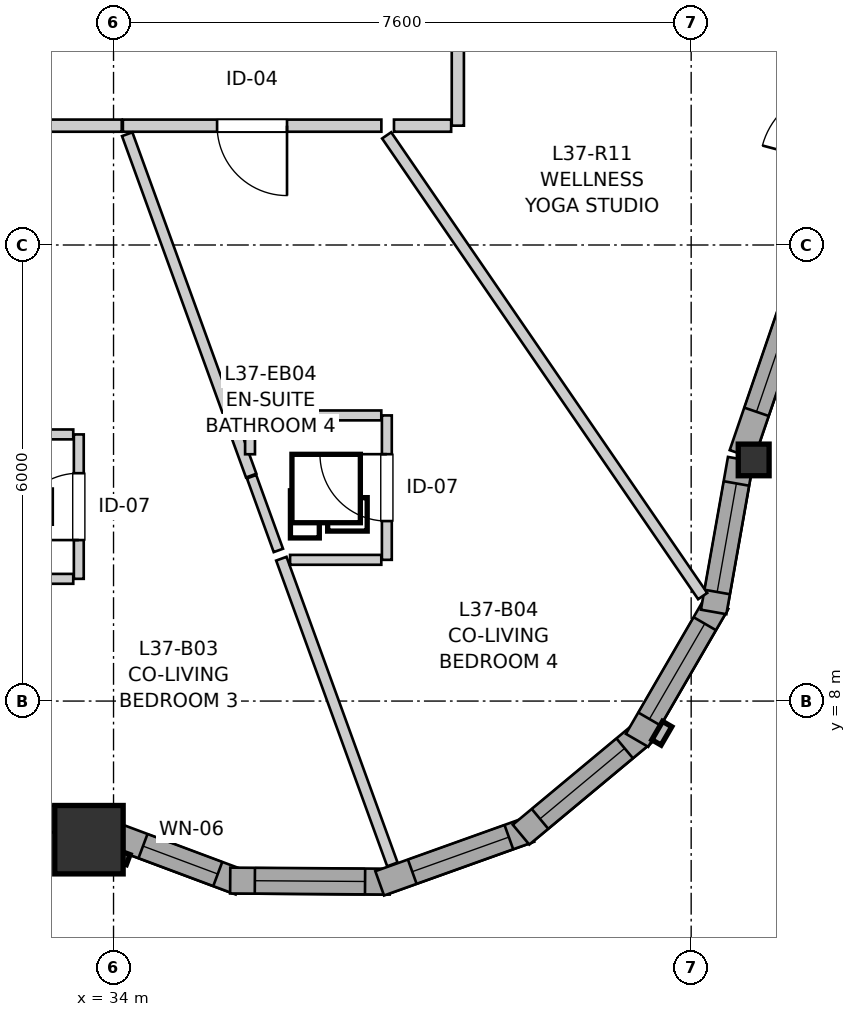
"""IFC4 building model, lengths in metres.
Left out: names, types, materials, properties, quantities, classifications, styles, units other than length and angle.
Written with IfcOpenShell. Run it as: python <this file> out.ifc"""

import sys

from ifc_helpers import new_model, si_unit, direction, frame, frame_2d, origin, origin_2d, place, context, subcontext, project, spatial, rectangle, i_section, extrude, source, transform, mapped, element, fill, save


model = new_model("IFC4")
c1 = context("Model", 3, precision=1e-05, world=origin(), true_north=direction((0.0, 1.0)))
c2 = subcontext(c1, "Body", "Model", "MODEL_VIEW")
j1 = project(units=[si_unit("LENGTHUNIT", "METRE"), si_unit("PLANEANGLEUNIT", "RADIAN")], contexts=[c1])
p1 = place(None, origin())
s1 = spatial("IfcSite", under=j1, at=p1, CompositionType="ELEMENT")
p2 = place(p1, origin())
s2 = spatial("IfcBuilding", under=s1, at=p2, CompositionType="ELEMENT")
p3 = place(p2, frame((0.0, 0.0, 124.8)))
s3 = spatial("IfcBuildingStorey", under=s2, at=p3, CompositionType="ELEMENT", Elevation=124.8)
m1 = source(origin(), c2, "Body", "SweptSolid", [
    extrude(rectangle(XDim=0.9, YDim=0.9, at=origin_2d()), origin(), (0.0, 0.0, 1.0), 2.9),
])
p4 = place(p3, frame((33.677, 6.176, 0.0), z_axis=(0.0, 0.0, 1.0), x_axis=(1.0, 0.0, 0.0)))
e1 = element("IfcColumn", 1, at=p4, inside=s3, PredefinedType="COLUMN", context=c2, shape_type="MappedRepresentation", body=[
    mapped(m1, transform((0.0, 0.0, 0.0), x_axis=(1.0, 0.0, 0.0), y_axis=(0.0, 1.0, 0.0), z_axis=(0.0, 0.0, 1.0), scale=1.0)),
])
m2 = source(origin(), c2, "Body", "SweptSolid", [
    extrude(i_section(OverallWidth=0.406, OverallDepth=0.416, WebThickness=0.027, FlangeThickness=0.044, FilletRadius=0.015, at=origin_2d()), origin(), (0.0, 0.0, 1.0), 2.9),
])
p5 = place(p3, frame((42.423, 11.172, 0.0), z_axis=(0.0, 0.0, 1.0), x_axis=(1.0, 0.0, 0.0)))
e2 = element("IfcColumn", 2, at=p5, inside=s3, PredefinedType="PILASTER", context=c2, shape_type="MappedRepresentation", body=[
    mapped(m2, transform((0.0, 0.0, 0.0), x_axis=(1.0, 0.0, 0.0), y_axis=(0.0, 1.0, 0.0), z_axis=(0.0, 0.0, 1.0), scale=1.0)),
])
p6 = place(p3, frame((30.652, 6.973, 0.0), z_axis=(0.0, 0.0, 1.0), x_axis=(0.979418300652, -0.201841007595, 0.0)))
e3 = element("IfcWall", 3, at=p6, inside=s3, PredefinedType="SOLIDWALL", context=c2, shape_type="SweptSolid", body=[
    extrude(rectangle(XDim=2.893, YDim=0.34, at=frame_2d((1.447, 0.0))), origin(), (0.0, 0.0, 1.0), 2.43),
])
p7 = place(p6, frame((0.383, 0.0, 0.82)))
e4 = element("IfcOpeningElement", 4, at=p7, cuts=e3, PredefinedType="OPENING", context=c2, shape_type="SweptSolid", body=[
    extrude(rectangle(XDim=0.58, YDim=1.35, at=frame_2d((0.29, 0.675))), frame((0.0, 0.18, 0.0), z_axis=(0.0, -1.0, 0.0), x_axis=(1.0, 0.0, 0.0)), (0.0, 0.0, 1.0), 0.36),
])
p8 = place(p6, frame((1.31, 0.0, 0.82)))
e5 = element("IfcOpeningElement", 5, at=p8, cuts=e3, PredefinedType="OPENING", context=c2, shape_type="SweptSolid", body=[
    extrude(rectangle(XDim=1.15, YDim=1.2, at=frame_2d((0.575, 0.6))), frame((0.0, 0.18, 0.0), z_axis=(0.0, -1.0, 0.0), x_axis=(1.0, 0.0, 0.0)), (0.0, 0.0, 1.0), 0.36),
])
p9 = place(p3, frame((33.952, 6.255, 0.0), z_axis=(0.0, 0.0, 1.0), x_axis=(0.936799566991, -0.349866504951, 0.0)))
e6 = element("IfcWall", 6, at=p9, inside=s3, PredefinedType="SOLIDWALL", context=c2, shape_type="SweptSolid", body=[
    extrude(rectangle(XDim=1.831, YDim=0.34, at=frame_2d((0.916, 0.0))), origin(), (0.0, 0.0, 1.0), 2.43),
])
p10 = place(p9, frame((0.466, 0.0, 0.82)))
e7 = element("IfcOpeningElement", 7, at=p10, cuts=e6, PredefinedType="OPENING", context=c2, shape_type="SweptSolid", body=[
    extrude(rectangle(XDim=1.05, YDim=1.45, at=frame_2d((0.525, 0.725))), frame((0.0, 0.18, 0.0), z_axis=(0.0, -1.0, 0.0), x_axis=(1.0, 0.0, 0.0)), (0.0, 0.0, 1.0), 0.36),
])
p11 = place(p3, frame((35.535, 5.639, 0.0), z_axis=(0.0, 0.0, 1.0), x_axis=(0.999976456891, -0.00686189939, 0.0)))
e8 = element("IfcWall", 8, at=p11, inside=s3, PredefinedType="SOLIDWALL", context=c2, shape_type="SweptSolid", body=[
    extrude(rectangle(XDim=2.099, YDim=0.34, at=frame_2d((1.05, 0.0))), origin(), (0.0, 0.0, 1.0), 2.43),
])
p12 = place(p11, frame((0.324, 0.0, 0.82)))
e9 = element("IfcOpeningElement", 9, at=p12, cuts=e8, PredefinedType="OPENING", context=c2, shape_type="SweptSolid", body=[
    extrude(rectangle(XDim=1.45, YDim=1.25, at=frame_2d((0.725, 0.625))), frame((0.0, 0.18, 0.0), z_axis=(0.0, -1.0, 0.0), x_axis=(1.0, 0.0, 0.0)), (0.0, 0.0, 1.0), 0.36),
])
p13 = place(p3, frame((37.502, 5.602, 0.0), z_axis=(0.0, 0.0, 1.0), x_axis=(0.941523304278, 0.336947870598, 0.0)))
e10 = element("IfcWall", 10, at=p13, inside=s3, PredefinedType="SOLIDWALL", context=c2, shape_type="SweptSolid", body=[
    extrude(rectangle(XDim=2.099, YDim=0.34, at=frame_2d((1.05, 0.0))), origin(), (0.0, 0.0, 1.0), 2.43),
])
p14 = place(p13, frame((0.455, 0.0, 0.82)))
e11 = element("IfcOpeningElement", 11, at=p14, cuts=e10, PredefinedType="OPENING", context=c2, shape_type="SweptSolid", body=[
    extrude(rectangle(XDim=1.35, YDim=1.45, at=frame_2d((0.675, 0.725))), frame((0.0, 0.18, 0.0), z_axis=(0.0, -1.0, 0.0), x_axis=(1.0, 0.0, 0.0)), (0.0, 0.0, 1.0), 0.36),
])
p15 = place(p3, frame((39.362, 6.242, 0.0), z_axis=(0.0, 0.0, 1.0), x_axis=(0.768440501876, 0.639921241308, 0.0)))
e12 = element("IfcWall", 12, at=p15, inside=s3, PredefinedType="SOLIDWALL", context=c2, shape_type="SweptSolid", body=[
    extrude(rectangle(XDim=2.099, YDim=0.34, at=frame_2d((1.05, 0.0))), origin(), (0.0, 0.0, 1.0), 2.43),
])
p16 = place(p15, frame((0.324, 0.0, 0.82)))
e13 = element("IfcOpeningElement", 13, at=p16, cuts=e12, PredefinedType="OPENING", context=c2, shape_type="SweptSolid", body=[
    extrude(rectangle(XDim=1.45, YDim=1.25, at=frame_2d((0.725, 0.625))), frame((0.0, 0.18, 0.0), z_axis=(0.0, -1.0, 0.0), x_axis=(1.0, 0.0, 0.0)), (0.0, 0.0, 1.0), 0.36),
])
p17 = place(p3, frame((40.888, 7.483, 0.0), z_axis=(0.0, 0.0, 1.0), x_axis=(0.501902596059, 0.864924149315, 0.0)))
e14 = element("IfcWall", 14, at=p17, inside=s3, PredefinedType="SOLIDWALL", context=c2, shape_type="SweptSolid", body=[
    extrude(rectangle(XDim=2.099, YDim=0.34, at=frame_2d((1.049, 0.0))), origin(), (0.0, 0.0, 1.0), 2.43),
])
p18 = place(p17, frame((0.324, 0.0, 0.82)))
e15 = element("IfcOpeningElement", 15, at=p18, cuts=e14, PredefinedType="OPENING", context=c2, shape_type="SweptSolid", body=[
    extrude(rectangle(XDim=1.45, YDim=1.25, at=frame_2d((0.725, 0.625))), frame((0.0, 0.18, 0.0), z_axis=(0.0, -1.0, 0.0), x_axis=(1.0, 0.0, 0.0)), (0.0, 0.0, 1.0), 0.36),
])
p19 = place(p3, frame((41.896, 9.173, 0.0), z_axis=(0.0, 0.0, 1.0), x_axis=(0.174399433509, 0.984674990843, 0.0)))
e16 = element("IfcWall", 16, at=p19, inside=s3, PredefinedType="SOLIDWALL", context=c2, shape_type="SweptSolid", body=[
    extrude(rectangle(XDim=2.041, YDim=0.34, at=frame_2d((1.021, 0.0))), origin(), (0.0, 0.0, 1.0), 2.43),
])
p20 = place(p19, frame((0.267, 0.0, 0.82)))
e17 = element("IfcOpeningElement", 17, at=p20, cuts=e16, PredefinedType="OPENING", context=c2, shape_type="SweptSolid", body=[
    extrude(rectangle(XDim=1.45, YDim=1.25, at=frame_2d((0.725, 0.625))), frame((0.0, 0.18, 0.0), z_axis=(0.0, -1.0, 0.0), x_axis=(1.0, 0.0, 0.0)), (0.0, 0.0, 1.0), 0.36),
])
p21 = place(p3, frame((42.268, 11.246, 0.0), z_axis=(0.0, 0.0, 1.0), x_axis=(0.323583674973, 0.946199558915, 0.0)))
e18 = element("IfcWall", 18, at=p21, inside=s3, PredefinedType="SOLIDWALL", context=c2, shape_type="SweptSolid", body=[
    extrude(rectangle(XDim=3.152, YDim=0.34, at=frame_2d((1.576, 0.0))), origin(), (0.0, 0.0, 1.0), 2.43),
])
p22 = place(p21, frame((0.591, 0.0, 0.82)))
e19 = element("IfcOpeningElement", 19, at=p22, cuts=e18, PredefinedType="OPENING", context=c2, shape_type="SweptSolid", body=[
    extrude(rectangle(XDim=1.95, YDim=1.4, at=frame_2d((0.975, 0.7))), frame((0.0, 0.18, 0.0), z_axis=(0.0, -1.0, 0.0), x_axis=(1.0, 0.0, 0.0)), (0.0, 0.0, 1.0), 0.36),
])
p23 = place(p3, frame((38.53, 21.321, 0.0), z_axis=(0.0, 0.0, 1.0), x_axis=(0.0, -1.0, 0.0)))
e20 = element("IfcWall", 20, at=p23, inside=s3, PredefinedType="PARTITIONING", context=c2, shape_type="SweptSolid", body=[
    extrude(rectangle(XDim=5.751, YDim=0.16, at=frame_2d((2.875, 0.0))), origin(), (0.0, 0.0, 1.0), 2.9),
])
p24 = place(p23, frame((2.404, 0.0, 0.0)))
e21 = element("IfcOpeningElement", 21, at=p24, cuts=e20, PredefinedType="OPENING", context=c2, shape_type="SweptSolid", body=[
    extrude(rectangle(XDim=0.96, YDim=2.1, at=frame_2d((0.48, 1.05))), frame((0.0, 0.09, 0.0), z_axis=(0.0, -1.0, 0.0), x_axis=(1.0, 0.0, 0.0)), (0.0, 0.0, 1.0), 0.18),
])
p25 = place(p3, frame((37.524, 15.57, 0.0), z_axis=(0.0, 0.0, 1.0), x_axis=(-1.0, 0.0, 0.0)))
e22 = element("IfcWall", 22, at=p25, inside=s3, PredefinedType="PARTITIONING", context=c2, shape_type="SweptSolid", body=[
    extrude(rectangle(XDim=3.401, YDim=0.16, at=frame_2d((1.7, 0.0))), origin(), (0.0, 0.0, 1.0), 2.9),
])
p26 = place(p25, frame((1.241, 0.0, 0.0)))
e23 = element("IfcOpeningElement", 23, at=p26, cuts=e22, PredefinedType="OPENING", context=c2, shape_type="SweptSolid", body=[
    extrude(rectangle(XDim=0.92, YDim=2.1, at=frame_2d((0.46, 1.05))), frame((0.0, 0.09, 0.0), z_axis=(0.0, -1.0, 0.0), x_axis=(1.0, 0.0, 0.0)), (0.0, 0.0, 1.0), 0.18),
])
p27 = place(p3, frame((34.108, 15.57, 0.0), z_axis=(0.0, 0.0, 1.0), x_axis=(-1.0, 0.0, 0.0)))
e24 = element("IfcWall", 24, at=p27, inside=s3, PredefinedType="PARTITIONING", context=c2, shape_type="SweptSolid", body=[
    extrude(rectangle(XDim=2.869, YDim=0.16, at=frame_2d((1.435, 0.0))), origin(), (0.0, 0.0, 1.0), 2.9),
])
p28 = place(p27, frame((0.974, 0.0, 0.0)))
e25 = element("IfcOpeningElement", 25, at=p28, cuts=e24, PredefinedType="OPENING", context=c2, shape_type="SweptSolid", body=[
    extrude(rectangle(XDim=0.92, YDim=2.1, at=frame_2d((0.46, 1.05))), frame((0.0, 0.09, 0.0), z_axis=(0.0, -1.0, 0.0), x_axis=(1.0, 0.0, 0.0)), (0.0, 0.0, 1.0), 0.18),
])
p29 = place(p3, frame((33.543, 9.608, 0.0), z_axis=(0.0, 0.0, 1.0), x_axis=(0.0, 1.0, 0.0)))
e26 = element("IfcWall", 26, at=p29, inside=s3, PredefinedType="PARTITIONING", context=c2, shape_type="SweptSolid", body=[
    extrude(rectangle(XDim=1.9, YDim=0.13, at=frame_2d((0.95, 0.0))), origin(), (0.0, 0.0, 1.0), 2.9),
])
p30 = place(p29, frame((0.51, 0.0, 0.0)))
e27 = element("IfcOpeningElement", 27, at=p30, cuts=e26, PredefinedType="OPENING", context=c2, shape_type="SweptSolid", body=[
    extrude(rectangle(XDim=0.88, YDim=2.05, at=frame_2d((0.44, 1.025))), frame((0.0, 0.075, 0.0), z_axis=(0.0, -1.0, 0.0), x_axis=(1.0, 0.0, 0.0)), (0.0, 0.0, 1.0), 0.15),
])
p31 = place(p3, frame((37.596, 9.858, 0.0), z_axis=(0.0, 0.0, 1.0), x_axis=(0.0, 1.0, 0.0)))
e28 = element("IfcWall", 28, at=p31, inside=s3, PredefinedType="PARTITIONING", context=c2, shape_type="SweptSolid", body=[
    extrude(rectangle(XDim=1.9, YDim=0.13, at=frame_2d((0.95, 0.0))), origin(), (0.0, 0.0, 1.0), 2.9),
])
p32 = place(p31, frame((0.51, 0.0, 0.0)))
e29 = element("IfcOpeningElement", 29, at=p32, cuts=e28, PredefinedType="OPENING", context=c2, shape_type="SweptSolid", body=[
    extrude(rectangle(XDim=0.88, YDim=2.05, at=frame_2d((0.44, 1.025))), frame((0.0, 0.075, 0.0), z_axis=(0.0, -1.0, 0.0), x_axis=(1.0, 0.0, 0.0)), (0.0, 0.0, 1.0), 0.15),
])
p33 = place(p3, frame((37.594, 15.442, 0.0), z_axis=(0.0, 0.0, 1.0), x_axis=(0.565681325722, -0.824623937155, 0.0)))
e30 = element("IfcWall", 30, at=p33, inside=s3, PredefinedType="PARTITIONING", context=c2, shape_type="SweptSolid", body=[
    extrude(rectangle(XDim=7.35, YDim=0.145, at=frame_2d((3.675, 0.0))), origin(), (0.0, 0.0, 1.0), 2.9),
])
p34 = place(p3, frame((34.18, 15.458, 0.0), z_axis=(0.0, 0.0, 1.0), x_axis=(0.341373856507, -0.939927598325, 0.0)))
e31 = element("IfcWall", 31, at=p34, inside=s3, PredefinedType="PARTITIONING", context=c2, shape_type="SweptSolid", body=[
    extrude(rectangle(XDim=4.779, YDim=0.145, at=frame_2d((2.389, 0.0))), origin(), (0.0, 0.0, 1.0), 2.9),
])
p35 = place(p3, frame((36.208, 9.873, 0.0), z_axis=(0.0, 0.0, 1.0), x_axis=(0.341362804218, -0.939931612351, 0.0)))
e32 = element("IfcWall", 32, at=p35, inside=s3, PredefinedType="PARTITIONING", context=c2, shape_type="SweptSolid", body=[
    extrude(rectangle(XDim=4.279, YDim=0.145, at=frame_2d((2.14, 0.0))), origin(), (0.0, 0.0, 1.0), 2.9),
])
p36 = place(p3, frame((31.743, 11.508, 0.0), z_axis=(0.0, 0.0, 1.0), x_axis=(1.0, 0.0, 0.0)))
e33 = element("IfcWall", 33, at=p36, inside=s3, PredefinedType="PARTITIONING", context=c2, shape_type="SweptSolid", body=[
    extrude(rectangle(XDim=1.727, YDim=0.13, at=frame_2d((0.864, 0.0))), origin(), (0.0, 0.0, 1.0), 2.9),
])
p37 = place(p3, frame((31.829, 9.608, 0.0), z_axis=(0.0, 0.0, 1.0), x_axis=(1.0, 0.0, 0.0)))
e34 = element("IfcWall", 34, at=p37, inside=s3, PredefinedType="PARTITIONING", context=c2, shape_type="SweptSolid", body=[
    extrude(rectangle(XDim=1.641, YDim=0.13, at=frame_2d((0.82, 0.0))), origin(), (0.0, 0.0, 1.0), 2.508),
])
p38 = place(p3, frame((35.796, 11.758, 0.0), z_axis=(0.0, 0.0, 1.0), x_axis=(1.0, 0.0, 0.0)))
e35 = element("IfcWall", 35, at=p38, inside=s3, PredefinedType="PARTITIONING", context=c2, shape_type="SweptSolid", body=[
    extrude(rectangle(XDim=1.727, YDim=0.13, at=frame_2d((0.864, 0.0))), origin(), (0.0, 0.0, 1.0), 2.9),
])
p39 = place(p3, frame((36.323, 9.858, 0.0), z_axis=(0.0, 0.0, 1.0), x_axis=(1.0, 0.0, 0.0)))
e36 = element("IfcWall", 36, at=p39, inside=s3, PredefinedType="PARTITIONING", context=c2, shape_type="SweptSolid", body=[
    extrude(rectangle(XDim=1.2, YDim=0.13, at=frame_2d((0.6, 0.0))), origin(), (0.0, 0.0, 1.0), 2.9),
])
p40 = place(p3, frame((35.816, 10.952, 0.0), z_axis=(0.0, 0.0, 1.0), x_axis=(0.341515178303, -0.939876259403, 0.0)))
e37 = element("IfcWall", 37, at=p40, inside=s3, PredefinedType="PARTITIONING", context=c2, shape_type="SweptSolid", body=[
    extrude(rectangle(XDim=1.032, YDim=0.13, at=frame_2d((0.516, 0.0))), origin(), (0.0, 0.0, 1.0), 2.9),
])
p41 = place(p3, frame((37.69, 15.57, 0.0), z_axis=(0.0, 0.0, 1.0), x_axis=(1.0, 0.0, 0.0)))
e38 = element("IfcWall", 38, at=p41, inside=s3, PredefinedType="PARTITIONING", context=c2, shape_type="SweptSolid", body=[
    extrude(rectangle(XDim=0.752, YDim=0.16, at=frame_2d((0.376, 0.0))), origin(), (0.0, 0.0, 1.0), 2.9),
])
p42 = place(p3, frame((35.796, 11.247, 0.0), z_axis=(0.0, 0.0, 1.0), x_axis=(0.0, 1.0, 0.0)))
e39 = element("IfcWall", 39, at=p42, inside=s3, PredefinedType="PARTITIONING", context=c2, shape_type="SweptSolid", body=[
    extrude(rectangle(XDim=0.438, YDim=0.13, at=frame_2d((0.219, 0.0))), origin(), (0.0, 0.0, 1.0), 2.9),
])
m3 = source(origin(), c2, "Body", "SweptSolid", [
    extrude(rectangle(XDim=1.05, YDim=1.45, at=frame_2d((0.525, 0.725))), frame((0.0, 0.03, 0.0), z_axis=(0.0, -1.0, 0.0), x_axis=(1.0, 0.0, 0.0)), (0.0, 0.0, 1.0), 0.06),
])
p43 = place(p10, origin())
e40 = element("IfcWindow", 40, at=p43, inside=s3, PartitioningType="SINGLE_PANEL", PredefinedType="WINDOW", context=c2, shape_type="MappedRepresentation", body=[
    mapped(m3, transform((0.0, 0.0, 0.0), x_axis=(1.0, 0.0, 0.0), y_axis=(0.0, 1.0, 0.0), z_axis=(0.0, 0.0, 1.0), scale=1.0)),
])
fill(e7, e40)
m4 = source(origin(), c2, "Body", "SweptSolid", [
    extrude(rectangle(XDim=1.45, YDim=1.25, at=frame_2d((0.725, 0.625))), frame((0.0, 0.03, 0.0), z_axis=(0.0, -1.0, 0.0), x_axis=(1.0, 0.0, 0.0)), (0.0, 0.0, 1.0), 0.06),
])
p44 = place(p12, origin())
e41 = element("IfcWindow", 41, at=p44, inside=s3, PartitioningType="SINGLE_PANEL", PredefinedType="WINDOW", context=c2, shape_type="MappedRepresentation", body=[
    mapped(m4, transform((0.0, 0.0, 0.0), x_axis=(1.0, 0.0, 0.0), y_axis=(0.0, 1.0, 0.0), z_axis=(0.0, 0.0, 1.0), scale=1.0)),
])
fill(e9, e41)
m5 = source(origin(), c2, "Body", "SweptSolid", [
    extrude(rectangle(XDim=1.35, YDim=1.45, at=frame_2d((0.675, 0.725))), frame((0.0, 0.03, 0.0), z_axis=(0.0, -1.0, 0.0), x_axis=(1.0, 0.0, 0.0)), (0.0, 0.0, 1.0), 0.06),
])
p45 = place(p14, origin())
e42 = element("IfcWindow", 42, at=p45, inside=s3, PartitioningType="SINGLE_PANEL", PredefinedType="WINDOW", context=c2, shape_type="MappedRepresentation", body=[
    mapped(m5, transform((0.0, 0.0, 0.0), x_axis=(1.0, 0.0, 0.0), y_axis=(0.0, 1.0, 0.0), z_axis=(0.0, 0.0, 1.0), scale=1.0)),
])
fill(e11, e42)
p46 = place(p16, origin())
e43 = element("IfcWindow", 43, at=p46, inside=s3, PartitioningType="SINGLE_PANEL", PredefinedType="WINDOW", context=c2, shape_type="MappedRepresentation", body=[
    mapped(m4, transform((0.0, 0.0, 0.0), x_axis=(1.0, 0.0, 0.0), y_axis=(0.0, 1.0, 0.0), z_axis=(0.0, 0.0, 1.0), scale=1.0)),
])
fill(e13, e43)
p47 = place(p18, origin())
e44 = element("IfcWindow", 44, at=p47, inside=s3, PartitioningType="SINGLE_PANEL", PredefinedType="WINDOW", context=c2, shape_type="MappedRepresentation", body=[
    mapped(m4, transform((0.0, 0.0, 0.0), x_axis=(1.0, 0.0, 0.0), y_axis=(0.0, 1.0, 0.0), z_axis=(0.0, 0.0, 1.0), scale=1.0)),
])
fill(e15, e44)
p48 = place(p20, origin())
e45 = element("IfcWindow", 45, at=p48, inside=s3, PartitioningType="SINGLE_PANEL", PredefinedType="WINDOW", context=c2, shape_type="MappedRepresentation", body=[
    mapped(m4, transform((0.0, 0.0, 0.0), x_axis=(1.0, 0.0, 0.0), y_axis=(0.0, 1.0, 0.0), z_axis=(0.0, 0.0, 1.0), scale=1.0)),
])
fill(e17, e45)
m6 = source(origin(), c2, "Body", "SweptSolid", [
    extrude(rectangle(XDim=1.95, YDim=1.4, at=frame_2d((0.975, 0.7))), frame((0.0, 0.03, 0.0), z_axis=(0.0, -1.0, 0.0), x_axis=(1.0, 0.0, 0.0)), (0.0, 0.0, 1.0), 0.06),
])
p49 = place(p22, origin())
e46 = element("IfcWindow", 46, at=p49, inside=s3, PartitioningType="SINGLE_PANEL", PredefinedType="WINDOW", context=c2, shape_type="MappedRepresentation", body=[
    mapped(m6, transform((0.0, 0.0, 0.0), x_axis=(1.0, 0.0, 0.0), y_axis=(0.0, 1.0, 0.0), z_axis=(0.0, 0.0, 1.0), scale=1.0)),
])
fill(e19, e46)
m7 = source(origin(), c2, "Body", "SweptSolid", [
    extrude(rectangle(XDim=0.92, YDim=2.1, at=frame_2d((0.46, 1.05))), frame((0.0, 0.025, 0.0), z_axis=(0.0, -1.0, 0.0), x_axis=(1.0, 0.0, 0.0)), (0.0, 0.0, 1.0), 0.05),
])
p50 = place(p26, origin())
e47 = element("IfcDoor", 47, at=p50, inside=s3, OperationType="SINGLE_SWING_LEFT", PredefinedType="DOOR", context=c2, shape_type="MappedRepresentation", body=[
    mapped(m7, transform((0.0, 0.0, 0.0), x_axis=(1.0, 0.0, 0.0), y_axis=(0.0, 1.0, 0.0), z_axis=(0.0, 0.0, 1.0), scale=1.0)),
])
fill(e23, e47)
m8 = source(origin(), c2, "Body", "SweptSolid", [
    extrude(rectangle(XDim=0.88, YDim=2.05, at=frame_2d((0.44, 1.025))), frame((0.0, 0.025, 0.0), z_axis=(0.0, -1.0, 0.0), x_axis=(1.0, 0.0, 0.0)), (0.0, 0.0, 1.0), 0.05),
])
p51 = place(p30, origin())
e48 = element("IfcDoor", 48, at=p51, inside=s3, OperationType="SINGLE_SWING_LEFT", PredefinedType="DOOR", context=c2, shape_type="MappedRepresentation", body=[
    mapped(m8, transform((0.0, 0.0, 0.0), x_axis=(1.0, 0.0, 0.0), y_axis=(0.0, 1.0, 0.0), z_axis=(0.0, 0.0, 1.0), scale=1.0)),
])
fill(e27, e48)
p52 = place(p32, origin())
e49 = element("IfcDoor", 49, at=p52, inside=s3, OperationType="SINGLE_SWING_RIGHT", PredefinedType="DOOR", context=c2, shape_type="MappedRepresentation", body=[
    mapped(m8, transform((0.0, 0.0, 0.0), x_axis=(1.0, 0.0, 0.0), y_axis=(0.0, 1.0, 0.0), z_axis=(0.0, 0.0, 1.0), scale=1.0)),
])
fill(e29, e49)
save(model, sys.argv[1])
